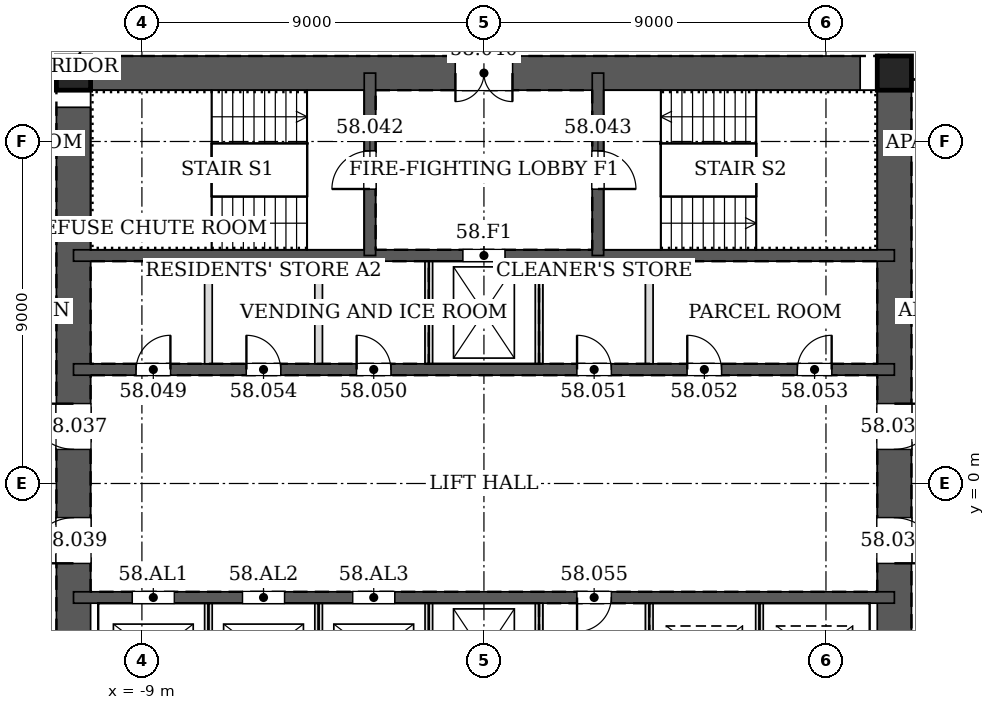
"""IFC4 building model, lengths in metres.
Left out: names, types, materials, properties, quantities, classifications, styles, units other than length and angle.
Written with IfcOpenShell. Run it as: python <this file> out.ifc"""

import sys

from ifc_helpers import new_model, si_unit, direction, frame, frame_2d, origin, origin_2d, place, context, subcontext, project, spatial, rectangle, hollow_rectangle, extrude, element, fill, save


model = new_model("IFC4")
c1 = context("Model", 3, precision=1e-05, world=origin(), true_north=direction((0.0, 1.0)))
c2 = subcontext(c1, "Body", "Model", "MODEL_VIEW")
j1 = project(units=[si_unit("LENGTHUNIT", "METRE"), si_unit("PLANEANGLEUNIT", "RADIAN")], contexts=[c1])
p1 = place(None, origin())
s1 = spatial("IfcSite", under=j1, at=p1, CompositionType="ELEMENT")
p2 = place(p1, origin())
s2 = spatial("IfcBuilding", under=s1, at=p2, CompositionType="ELEMENT")
p3 = place(p2, frame((0.0, 0.0, 244.8)))
s3 = spatial("IfcBuildingStorey", under=s2, at=p3, CompositionType="ELEMENT", Elevation=244.8)
for number, where, z_axis, x_axis in (
    (1, (10.8, 10.8, 0.0), (0.0, 0.0, 1.0), (1.0, 0.0, 0.0)),
    (2, (-10.8, 10.8, 0.0), (0.0, 0.0, 1.0), (1.0, 0.0, 0.0)),
):
    element("IfcColumn", number, at=place(p3, frame(where, z_axis=z_axis, x_axis=x_axis)), inside=s3, PredefinedType="COLUMN", context=c2, shape_type="SweptSolid", body=[
        extrude(hollow_rectangle(XDim=0.9, YDim=0.9, WallThickness=0.04, at=origin_2d()), origin(), (0.0, 0.0, 1.0), 3.4),
    ])
p4 = place(p3, frame((10.8, -10.8, 0.0), z_axis=(0.0, 0.0, 1.0), x_axis=(0.0, 1.0, 0.0)))
e3 = element("IfcWall", 3, at=p4, inside=s3, PredefinedType="SOLIDWALL", context=c2, shape_type="SweptSolid", body=[
    extrude(rectangle(XDim=21.6, YDim=0.9, at=frame_2d((10.8, 0.0))), origin(), (0.0, 0.0, 1.0), 3.4),
])
p5 = place(p4, frame((11.7, 0.0, 0.0)))
e4 = element("IfcOpeningElement", 4, at=p5, cuts=e3, PredefinedType="OPENING", context=c2, shape_type="SweptSolid", body=[
    extrude(rectangle(XDim=1.2, YDim=2.1, at=frame_2d((0.6, 1.05))), frame((0.0, 0.46, 0.0), z_axis=(0.0, -1.0, 0.0), x_axis=(1.0, 0.0, 0.0)), (0.0, 0.0, 1.0), 0.92),
])
p6 = place(p4, frame((8.7, 0.0, 0.0)))
e5 = element("IfcOpeningElement", 5, at=p6, cuts=e3, PredefinedType="OPENING", context=c2, shape_type="SweptSolid", body=[
    extrude(rectangle(XDim=1.2, YDim=2.1, at=frame_2d((0.6, 1.05))), frame((0.0, 0.46, 0.0), z_axis=(0.0, -1.0, 0.0), x_axis=(1.0, 0.0, 0.0)), (0.0, 0.0, 1.0), 0.92),
])
p7 = place(p3, frame((10.8, 10.8, 0.0), z_axis=(0.0, 0.0, 1.0), x_axis=(-1.0, 0.0, 0.0)))
e6 = element("IfcWall", 6, at=p7, inside=s3, PredefinedType="SOLIDWALL", context=c2, shape_type="SweptSolid", body=[
    extrude(rectangle(XDim=21.6, YDim=0.9, at=frame_2d((10.8, 0.0))), origin(), (0.0, 0.0, 1.0), 3.4),
])
p8 = place(p7, frame((10.05, 0.0, 0.0)))
e7 = element("IfcOpeningElement", 7, at=p8, cuts=e6, PredefinedType="OPENING", context=c2, shape_type="SweptSolid", body=[
    extrude(rectangle(XDim=1.5, YDim=2.1, at=frame_2d((0.75, 1.05))), frame((0.0, 0.46, 0.0), z_axis=(0.0, -1.0, 0.0), x_axis=(1.0, 0.0, 0.0)), (0.0, 0.0, 1.0), 0.92),
])
p9 = place(p3, frame((-10.8, 10.8, 0.0), z_axis=(0.0, 0.0, 1.0), x_axis=(0.0, -1.0, 0.0)))
e8 = element("IfcWall", 8, at=p9, inside=s3, PredefinedType="SOLIDWALL", context=c2, shape_type="SweptSolid", body=[
    extrude(rectangle(XDim=21.6, YDim=0.9, at=frame_2d((10.8, 0.0))), origin(), (0.0, 0.0, 1.0), 3.4),
])
p10 = place(p9, frame((8.7, 0.0, 0.0)))
e9 = element("IfcOpeningElement", 9, at=p10, cuts=e8, PredefinedType="OPENING", context=c2, shape_type="SweptSolid", body=[
    extrude(rectangle(XDim=1.2, YDim=2.1, at=frame_2d((0.6, 1.05))), frame((0.0, 0.46, 0.0), z_axis=(0.0, -1.0, 0.0), x_axis=(1.0, 0.0, 0.0)), (0.0, 0.0, 1.0), 0.92),
])
p11 = place(p9, frame((11.7, 0.0, 0.0)))
e10 = element("IfcOpeningElement", 10, at=p11, cuts=e8, PredefinedType="OPENING", context=c2, shape_type="SweptSolid", body=[
    extrude(rectangle(XDim=1.2, YDim=2.1, at=frame_2d((0.6, 1.05))), frame((0.0, 0.46, 0.0), z_axis=(0.0, -1.0, 0.0), x_axis=(1.0, 0.0, 0.0)), (0.0, 0.0, 1.0), 0.92),
])
p12 = place(p3, frame((-10.8, 3.0, 0.0), z_axis=(0.0, 0.0, 1.0), x_axis=(1.0, 0.0, 0.0)))
e11 = element("IfcWall", 11, at=p12, inside=s3, PredefinedType="SOLIDWALL", context=c2, shape_type="SweptSolid", body=[
    extrude(rectangle(XDim=21.6, YDim=0.3, at=frame_2d((10.8, 0.0))), origin(), (0.0, 0.0, 1.0), 3.4),
])
p13 = place(p12, frame((1.65, 0.0, 0.0)))
e12 = element("IfcOpeningElement", 12, at=p13, cuts=e11, PredefinedType="OPENING", context=c2, shape_type="SweptSolid", body=[
    extrude(rectangle(XDim=0.9, YDim=2.1, at=frame_2d((0.45, 1.05))), frame((0.0, 0.16, 0.0), z_axis=(0.0, -1.0, 0.0), x_axis=(1.0, 0.0, 0.0)), (0.0, 0.0, 1.0), 0.32),
])
p14 = place(p12, frame((7.45, 0.0, 0.0)))
e13 = element("IfcOpeningElement", 13, at=p14, cuts=e11, PredefinedType="OPENING", context=c2, shape_type="SweptSolid", body=[
    extrude(rectangle(XDim=0.9, YDim=2.1, at=frame_2d((0.45, 1.05))), frame((0.0, 0.16, 0.0), z_axis=(0.0, -1.0, 0.0), x_axis=(1.0, 0.0, 0.0)), (0.0, 0.0, 1.0), 0.32),
])
p15 = place(p12, frame((13.25, 0.0, 0.0)))
e14 = element("IfcOpeningElement", 14, at=p15, cuts=e11, PredefinedType="OPENING", context=c2, shape_type="SweptSolid", body=[
    extrude(rectangle(XDim=0.9, YDim=2.1, at=frame_2d((0.45, 1.05))), frame((0.0, 0.16, 0.0), z_axis=(0.0, -1.0, 0.0), x_axis=(1.0, 0.0, 0.0)), (0.0, 0.0, 1.0), 0.32),
])
p16 = place(p12, frame((16.15, 0.0, 0.0)))
e15 = element("IfcOpeningElement", 15, at=p16, cuts=e11, PredefinedType="OPENING", context=c2, shape_type="SweptSolid", body=[
    extrude(rectangle(XDim=0.9, YDim=2.1, at=frame_2d((0.45, 1.05))), frame((0.0, 0.16, 0.0), z_axis=(0.0, -1.0, 0.0), x_axis=(1.0, 0.0, 0.0)), (0.0, 0.0, 1.0), 0.32),
])
p17 = place(p12, frame((19.05, 0.0, 0.0)))
e16 = element("IfcOpeningElement", 16, at=p17, cuts=e11, PredefinedType="OPENING", context=c2, shape_type="SweptSolid", body=[
    extrude(rectangle(XDim=0.9, YDim=2.1, at=frame_2d((0.45, 1.05))), frame((0.0, 0.16, 0.0), z_axis=(0.0, -1.0, 0.0), x_axis=(1.0, 0.0, 0.0)), (0.0, 0.0, 1.0), 0.32),
])
p18 = place(p12, frame((4.55, 0.0, 0.0)))
e17 = element("IfcOpeningElement", 17, at=p18, cuts=e11, PredefinedType="OPENING", context=c2, shape_type="SweptSolid", body=[
    extrude(rectangle(XDim=0.9, YDim=2.1, at=frame_2d((0.45, 1.05))), frame((0.0, 0.16, 0.0), z_axis=(0.0, -1.0, 0.0), x_axis=(1.0, 0.0, 0.0)), (0.0, 0.0, 1.0), 0.32),
])
p19 = place(p3, frame((-10.8, 6.0, 0.0), z_axis=(0.0, 0.0, 1.0), x_axis=(1.0, 0.0, 0.0)))
e18 = element("IfcWall", 18, at=p19, inside=s3, PredefinedType="SOLIDWALL", context=c2, shape_type="SweptSolid", body=[
    extrude(rectangle(XDim=21.6, YDim=0.3, at=frame_2d((10.8, 0.0))), origin(), (0.0, 0.0, 1.0), 3.4),
])
p20 = place(p19, frame((10.25, 0.0, 0.0)))
e19 = element("IfcOpeningElement", 19, at=p20, cuts=e18, PredefinedType="OPENING", context=c2, shape_type="SweptSolid", body=[
    extrude(rectangle(XDim=1.1, YDim=2.1, at=frame_2d((0.55, 1.05))), frame((0.0, 0.16, 0.0), z_axis=(0.0, -1.0, 0.0), x_axis=(1.0, 0.0, 0.0)), (0.0, 0.0, 1.0), 0.32),
])
p21 = place(p3, frame((-3.0, 6.0, 0.0), z_axis=(0.0, 0.0, 1.0), x_axis=(0.0, 1.0, 0.0)))
e20 = element("IfcWall", 20, at=p21, inside=s3, PredefinedType="SOLIDWALL", context=c2, shape_type="SweptSolid", body=[
    extrude(rectangle(XDim=4.8, YDim=0.3, at=frame_2d((2.4, 0.0))), origin(), (0.0, 0.0, 1.0), 3.4),
])
p22 = place(p21, frame((1.75, 0.0, 0.0)))
e21 = element("IfcOpeningElement", 21, at=p22, cuts=e20, PredefinedType="OPENING", context=c2, shape_type="SweptSolid", body=[
    extrude(rectangle(XDim=1.0, YDim=2.1, at=frame_2d((0.5, 1.05))), frame((0.0, 0.16, 0.0), z_axis=(0.0, -1.0, 0.0), x_axis=(1.0, 0.0, 0.0)), (0.0, 0.0, 1.0), 0.32),
])
p23 = place(p3, frame((3.0, 6.0, 0.0), z_axis=(0.0, 0.0, 1.0), x_axis=(0.0, 1.0, 0.0)))
e22 = element("IfcWall", 22, at=p23, inside=s3, PredefinedType="SOLIDWALL", context=c2, shape_type="SweptSolid", body=[
    extrude(rectangle(XDim=4.8, YDim=0.3, at=frame_2d((2.4, 0.0))), origin(), (0.0, 0.0, 1.0), 3.4),
])
p24 = place(p23, frame((1.75, 0.0, 0.0)))
e23 = element("IfcOpeningElement", 23, at=p24, cuts=e22, PredefinedType="OPENING", context=c2, shape_type="SweptSolid", body=[
    extrude(rectangle(XDim=1.0, YDim=2.1, at=frame_2d((0.5, 1.05))), frame((0.0, 0.16, 0.0), z_axis=(0.0, -1.0, 0.0), x_axis=(1.0, 0.0, 0.0)), (0.0, 0.0, 1.0), 0.32),
])
p25 = place(p3, frame((-10.8, -3.0, 0.0), z_axis=(0.0, 0.0, 1.0), x_axis=(1.0, 0.0, 0.0)))
e24 = element("IfcWall", 24, at=p25, inside=s3, PredefinedType="SOLIDWALL", context=c2, shape_type="SweptSolid", body=[
    extrude(rectangle(XDim=21.6, YDim=0.3, at=frame_2d((10.8, 0.0))), origin(), (0.0, 0.0, 1.0), 3.4),
])
p26 = place(p25, frame((13.25, 0.0, 0.0)))
e25 = element("IfcOpeningElement", 25, at=p26, cuts=e24, PredefinedType="OPENING", context=c2, shape_type="SweptSolid", body=[
    extrude(rectangle(XDim=0.9, YDim=2.1, at=frame_2d((0.45, 1.05))), frame((0.0, 0.16, 0.0), z_axis=(0.0, -1.0, 0.0), x_axis=(1.0, 0.0, 0.0)), (0.0, 0.0, 1.0), 0.32),
])
p27 = place(p25, frame((1.55, 0.0, 0.0)))
e26 = element("IfcOpeningElement", 26, at=p27, cuts=e24, PredefinedType="OPENING", context=c2, shape_type="SweptSolid", body=[
    extrude(rectangle(XDim=1.1, YDim=2.1, at=frame_2d((0.55, 1.05))), frame((0.0, 0.16, 0.0), z_axis=(0.0, -1.0, 0.0), x_axis=(1.0, 0.0, 0.0)), (0.0, 0.0, 1.0), 0.32),
])
p28 = place(p25, frame((4.45, 0.0, 0.0)))
e27 = element("IfcOpeningElement", 27, at=p28, cuts=e24, PredefinedType="OPENING", context=c2, shape_type="SweptSolid", body=[
    extrude(rectangle(XDim=1.1, YDim=2.1, at=frame_2d((0.55, 1.05))), frame((0.0, 0.16, 0.0), z_axis=(0.0, -1.0, 0.0), x_axis=(1.0, 0.0, 0.0)), (0.0, 0.0, 1.0), 0.32),
])
p29 = place(p25, frame((7.35, 0.0, 0.0)))
e28 = element("IfcOpeningElement", 28, at=p29, cuts=e24, PredefinedType="OPENING", context=c2, shape_type="SweptSolid", body=[
    extrude(rectangle(XDim=1.1, YDim=2.1, at=frame_2d((0.55, 1.05))), frame((0.0, 0.16, 0.0), z_axis=(0.0, -1.0, 0.0), x_axis=(1.0, 0.0, 0.0)), (0.0, 0.0, 1.0), 0.32),
])
for number, where, z_axis, x_axis in (
    (29, (-7.25, 3.15, 0.0), (0.0, 0.0, 1.0), (0.0, 1.0, 0.0)),
    (30, (-4.35, 3.15, 0.0), (0.0, 0.0, 1.0), (0.0, 1.0, 0.0)),
    (31, (-1.45, 3.15, 0.0), (0.0, 0.0, 1.0), (0.0, 1.0, 0.0)),
    (32, (1.45, 3.15, 0.0), (0.0, 0.0, 1.0), (0.0, 1.0, 0.0)),
    (33, (4.35, 3.15, 0.0), (0.0, 0.0, 1.0), (0.0, 1.0, 0.0)),
):
    element("IfcWall", number, at=place(p3, frame(where, z_axis=z_axis, x_axis=x_axis)), inside=s3, PredefinedType="PARTITIONING", context=c2, shape_type="SweptSolid", body=[
        extrude(rectangle(XDim=2.7, YDim=0.2, at=frame_2d((1.35, 0.0))), origin(), (0.0, 0.0, 1.0), 3.2),
    ])
for number, where, z_axis, x_axis in (
    (34, (-7.25, -5.85, 0.0), (0.0, 0.0, 1.0), (0.0, 1.0, 0.0)),
    (35, (-4.35, -5.85, 0.0), (0.0, 0.0, 1.0), (0.0, 1.0, 0.0)),
    (36, (-1.45, -5.85, 0.0), (0.0, 0.0, 1.0), (0.0, 1.0, 0.0)),
):
    element("IfcWall", number, at=place(p3, frame(where, z_axis=z_axis, x_axis=x_axis)), inside=s3, PredefinedType="PARTITIONING", context=c2, shape_type="SweptSolid", body=[
        extrude(rectangle(XDim=2.7, YDim=0.2, at=frame_2d((1.35, 0.0))), origin(), (0.0, 0.0, 1.0), 3.4),
    ])
for number, where, z_axis, x_axis in (
    (37, (1.45, -5.85, 0.0), (0.0, 0.0, 1.0), (0.0, 1.0, 0.0)),
    (38, (4.35, -5.85, 0.0), (0.0, 0.0, 1.0), (0.0, 1.0, 0.0)),
):
    element("IfcWall", number, at=place(p3, frame(where, z_axis=z_axis, x_axis=x_axis)), inside=s3, PredefinedType="PARTITIONING", context=c2, shape_type="SweptSolid", body=[
        extrude(rectangle(XDim=2.7, YDim=0.2, at=frame_2d((1.35, 0.0))), origin(), (0.0, 0.0, 1.0), 3.2),
    ])
p30 = place(p3, frame((7.25, -5.85, 0.0), z_axis=(0.0, 0.0, 1.0), x_axis=(0.0, 1.0, 0.0)))
e39 = element("IfcWall", 39, at=p30, inside=s3, PredefinedType="PARTITIONING", context=c2, shape_type="SweptSolid", body=[
    extrude(rectangle(XDim=2.7, YDim=0.2, at=frame_2d((1.35, 0.0))), origin(), (0.0, 0.0, 1.0), 3.4),
])
p31 = place(p5, frame((1.2, 0.0, 0.0), z_axis=(0.0, 0.0, 1.0), x_axis=(-1.0, 0.0, 0.0)))
e40 = element("IfcDoor", 40, at=p31, inside=s3, OperationType="SINGLE_SWING_LEFT", PredefinedType="DOOR", context=c2, shape_type="SweptSolid", body=[
    extrude(rectangle(XDim=1.2, YDim=2.1, at=frame_2d((0.6, 1.05))), frame((0.0, 0.025, 0.0), z_axis=(0.0, -1.0, 0.0), x_axis=(1.0, 0.0, 0.0)), (0.0, 0.0, 1.0), 0.05),
])
fill(e4, e40)
p32 = place(p10, frame((1.2, 0.0, 0.0), z_axis=(0.0, 0.0, 1.0), x_axis=(-1.0, 0.0, 0.0)))
e41 = element("IfcDoor", 41, at=p32, inside=s3, OperationType="SINGLE_SWING_RIGHT", PredefinedType="DOOR", context=c2, shape_type="SweptSolid", body=[
    extrude(rectangle(XDim=1.2, YDim=2.1, at=frame_2d((0.6, 1.05))), frame((0.0, 0.025, 0.0), z_axis=(0.0, -1.0, 0.0), x_axis=(1.0, 0.0, 0.0)), (0.0, 0.0, 1.0), 0.05),
])
fill(e9, e41)
p33 = place(p6, frame((1.2, 0.0, 0.0), z_axis=(0.0, 0.0, 1.0), x_axis=(-1.0, 0.0, 0.0)))
e42 = element("IfcDoor", 42, at=p33, inside=s3, OperationType="SINGLE_SWING_RIGHT", PredefinedType="DOOR", context=c2, shape_type="SweptSolid", body=[
    extrude(rectangle(XDim=1.2, YDim=2.1, at=frame_2d((0.6, 1.05))), frame((0.0, 0.025, 0.0), z_axis=(0.0, -1.0, 0.0), x_axis=(1.0, 0.0, 0.0)), (0.0, 0.0, 1.0), 0.05),
])
fill(e5, e42)
p34 = place(p11, frame((1.2, 0.0, 0.0), z_axis=(0.0, 0.0, 1.0), x_axis=(-1.0, 0.0, 0.0)))
e43 = element("IfcDoor", 43, at=p34, inside=s3, OperationType="SINGLE_SWING_LEFT", PredefinedType="DOOR", context=c2, shape_type="SweptSolid", body=[
    extrude(rectangle(XDim=1.2, YDim=2.1, at=frame_2d((0.6, 1.05))), frame((0.0, 0.025, 0.0), z_axis=(0.0, -1.0, 0.0), x_axis=(1.0, 0.0, 0.0)), (0.0, 0.0, 1.0), 0.05),
])
fill(e10, e43)
p35 = place(p8, origin())
e44 = element("IfcDoor", 44, at=p35, inside=s3, OperationType="DOUBLE_DOOR_SINGLE_SWING", PredefinedType="DOOR", context=c2, shape_type="SweptSolid", body=[
    extrude(rectangle(XDim=1.5, YDim=2.1, at=frame_2d((0.75, 1.05))), frame((0.0, 0.025, 0.0), z_axis=(0.0, -1.0, 0.0), x_axis=(1.0, 0.0, 0.0)), (0.0, 0.0, 1.0), 0.05),
])
fill(e7, e44)
p36 = place(p22, origin())
e45 = element("IfcDoor", 45, at=p36, inside=s3, OperationType="SINGLE_SWING_LEFT", PredefinedType="DOOR", context=c2, shape_type="SweptSolid", body=[
    extrude(rectangle(XDim=1.0, YDim=2.1, at=frame_2d((0.5, 1.05))), frame((0.0, 0.025, 0.0), z_axis=(0.0, -1.0, 0.0), x_axis=(1.0, 0.0, 0.0)), (0.0, 0.0, 1.0), 0.05),
])
fill(e21, e45)
p37 = place(p24, frame((1.0, 0.0, 0.0), z_axis=(0.0, 0.0, 1.0), x_axis=(-1.0, 0.0, 0.0)))
e46 = element("IfcDoor", 46, at=p37, inside=s3, OperationType="SINGLE_SWING_RIGHT", PredefinedType="DOOR", context=c2, shape_type="SweptSolid", body=[
    extrude(rectangle(XDim=1.0, YDim=2.1, at=frame_2d((0.5, 1.05))), frame((0.0, 0.025, 0.0), z_axis=(0.0, -1.0, 0.0), x_axis=(1.0, 0.0, 0.0)), (0.0, 0.0, 1.0), 0.05),
])
fill(e23, e46)
p38 = place(p13, origin())
e47 = element("IfcDoor", 47, at=p38, inside=s3, OperationType="SINGLE_SWING_RIGHT", PredefinedType="DOOR", context=c2, shape_type="SweptSolid", body=[
    extrude(rectangle(XDim=0.9, YDim=2.1, at=frame_2d((0.45, 1.05))), frame((0.0, 0.025, 0.0), z_axis=(0.0, -1.0, 0.0), x_axis=(1.0, 0.0, 0.0)), (0.0, 0.0, 1.0), 0.05),
])
fill(e12, e47)
p39 = place(p14, origin())
e48 = element("IfcDoor", 48, at=p39, inside=s3, OperationType="SINGLE_SWING_LEFT", PredefinedType="DOOR", context=c2, shape_type="SweptSolid", body=[
    extrude(rectangle(XDim=0.9, YDim=2.1, at=frame_2d((0.45, 1.05))), frame((0.0, 0.025, 0.0), z_axis=(0.0, -1.0, 0.0), x_axis=(1.0, 0.0, 0.0)), (0.0, 0.0, 1.0), 0.05),
])
fill(e13, e48)
p40 = place(p15, origin())
e49 = element("IfcDoor", 49, at=p40, inside=s3, OperationType="SINGLE_SWING_LEFT", PredefinedType="DOOR", context=c2, shape_type="SweptSolid", body=[
    extrude(rectangle(XDim=0.9, YDim=2.1, at=frame_2d((0.45, 1.05))), frame((0.0, 0.025, 0.0), z_axis=(0.0, -1.0, 0.0), x_axis=(1.0, 0.0, 0.0)), (0.0, 0.0, 1.0), 0.05),
])
fill(e14, e49)
p41 = place(p16, origin())
e50 = element("IfcDoor", 50, at=p41, inside=s3, OperationType="SINGLE_SWING_LEFT", PredefinedType="DOOR", context=c2, shape_type="SweptSolid", body=[
    extrude(rectangle(XDim=0.9, YDim=2.1, at=frame_2d((0.45, 1.05))), frame((0.0, 0.025, 0.0), z_axis=(0.0, -1.0, 0.0), x_axis=(1.0, 0.0, 0.0)), (0.0, 0.0, 1.0), 0.05),
])
fill(e15, e50)
p42 = place(p17, origin())
e51 = element("IfcDoor", 51, at=p42, inside=s3, OperationType="SINGLE_SWING_RIGHT", PredefinedType="DOOR", context=c2, shape_type="SweptSolid", body=[
    extrude(rectangle(XDim=0.9, YDim=2.1, at=frame_2d((0.45, 1.05))), frame((0.0, 0.025, 0.0), z_axis=(0.0, -1.0, 0.0), x_axis=(1.0, 0.0, 0.0)), (0.0, 0.0, 1.0), 0.05),
])
fill(e16, e51)
p43 = place(p18, origin())
e52 = element("IfcDoor", 52, at=p43, inside=s3, OperationType="SINGLE_SWING_LEFT", PredefinedType="DOOR", context=c2, shape_type="SweptSolid", body=[
    extrude(rectangle(XDim=0.9, YDim=2.1, at=frame_2d((0.45, 1.05))), frame((0.0, 0.025, 0.0), z_axis=(0.0, -1.0, 0.0), x_axis=(1.0, 0.0, 0.0)), (0.0, 0.0, 1.0), 0.05),
])
fill(e17, e52)
p44 = place(p26, frame((0.9, 0.0, 0.0), z_axis=(0.0, 0.0, 1.0), x_axis=(-1.0, 0.0, 0.0)))
e53 = element("IfcDoor", 53, at=p44, inside=s3, OperationType="SINGLE_SWING_RIGHT", PredefinedType="DOOR", context=c2, shape_type="SweptSolid", body=[
    extrude(rectangle(XDim=0.9, YDim=2.1, at=frame_2d((0.45, 1.05))), frame((0.0, 0.025, 0.0), z_axis=(0.0, -1.0, 0.0), x_axis=(1.0, 0.0, 0.0)), (0.0, 0.0, 1.0), 0.05),
])
fill(e25, e53)
p45 = place(p20, origin())
e54 = element("IfcDoor", 54, at=p45, inside=s3, OperationType="DOUBLE_DOOR_SLIDING", PredefinedType="DOOR", context=c2, shape_type="SweptSolid", body=[
    extrude(rectangle(XDim=1.1, YDim=2.1, at=frame_2d((0.55, 1.05))), frame((0.0, 0.025, 0.0), z_axis=(0.0, -1.0, 0.0), x_axis=(1.0, 0.0, 0.0)), (0.0, 0.0, 1.0), 0.05),
])
fill(e19, e54)
p46 = place(p27, origin())
e55 = element("IfcDoor", 55, at=p46, inside=s3, OperationType="DOUBLE_DOOR_SLIDING", PredefinedType="DOOR", context=c2, shape_type="SweptSolid", body=[
    extrude(rectangle(XDim=1.1, YDim=2.1, at=frame_2d((0.55, 1.05))), frame((0.0, 0.025, 0.0), z_axis=(0.0, -1.0, 0.0), x_axis=(1.0, 0.0, 0.0)), (0.0, 0.0, 1.0), 0.05),
])
fill(e26, e55)
p47 = place(p28, origin())
e56 = element("IfcDoor", 56, at=p47, inside=s3, OperationType="DOUBLE_DOOR_SLIDING", PredefinedType="DOOR", context=c2, shape_type="SweptSolid", body=[
    extrude(rectangle(XDim=1.1, YDim=2.1, at=frame_2d((0.55, 1.05))), frame((0.0, 0.025, 0.0), z_axis=(0.0, -1.0, 0.0), x_axis=(1.0, 0.0, 0.0)), (0.0, 0.0, 1.0), 0.05),
])
fill(e27, e56)
p48 = place(p29, origin())
e57 = element("IfcDoor", 57, at=p48, inside=s3, OperationType="DOUBLE_DOOR_SLIDING", PredefinedType="DOOR", context=c2, shape_type="SweptSolid", body=[
    extrude(rectangle(XDim=1.1, YDim=2.1, at=frame_2d((0.55, 1.05))), frame((0.0, 0.025, 0.0), z_axis=(0.0, -1.0, 0.0), x_axis=(1.0, 0.0, 0.0)), (0.0, 0.0, 1.0), 0.05),
])
fill(e28, e57)
save(model, sys.argv[1])
